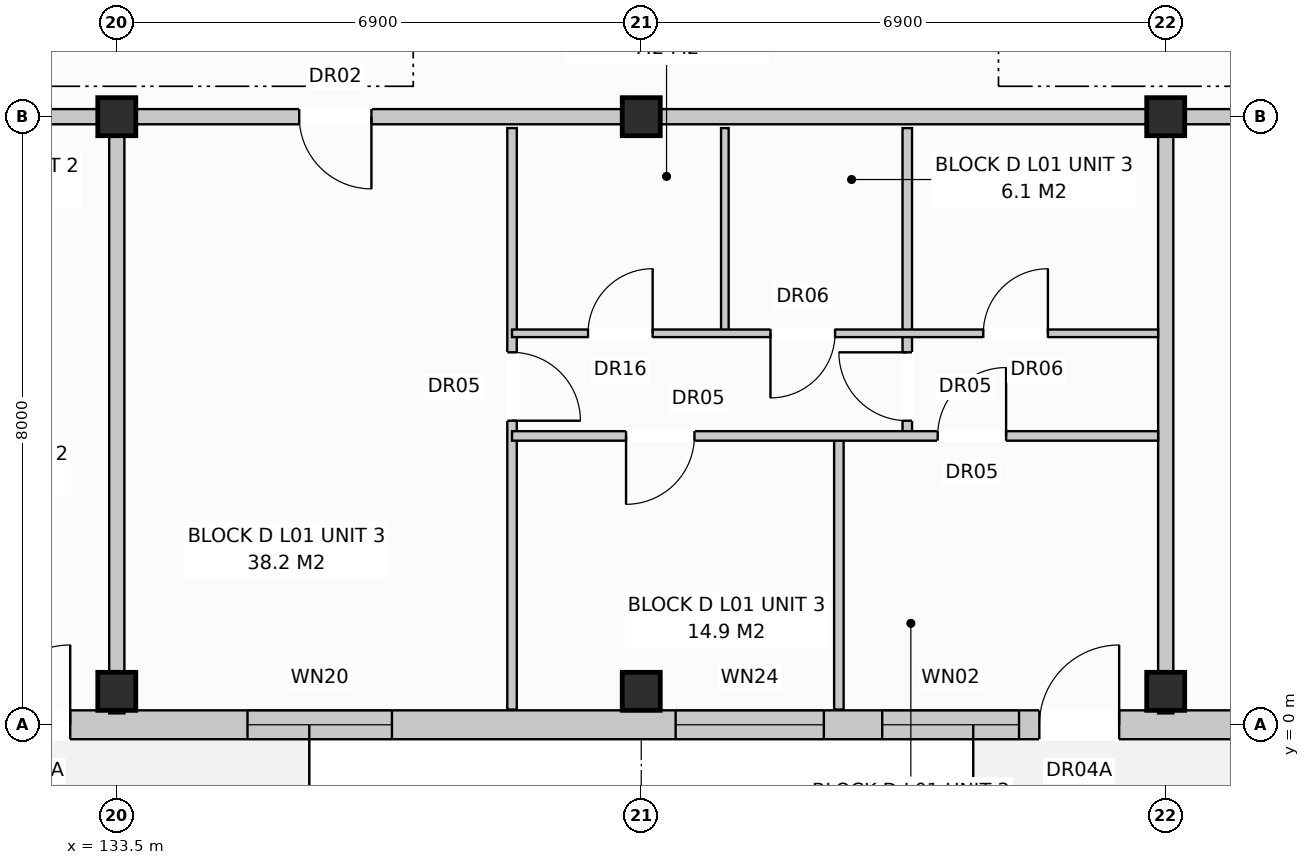
"""IFC4 building model, lengths in metres.
Left out: names, types, materials, properties, quantities, classifications, styles, units other than length and angle.
Written with IfcOpenShell. Run it as: python <this file> out.ifc"""

import sys

from ifc_helpers import new_model, si_unit, direction, frame, frame_2d, origin, origin_with_axes, origin_2d, place, context, subcontext, project, spatial, rectangle, extrude, element, fill, save


model = new_model("IFC4")
c1 = context("Model", 3, precision=1e-05, world=origin(), true_north=direction((0.0, 1.0)))
c2 = subcontext(c1, "Body", "Model", "MODEL_VIEW")
j1 = project(units=[si_unit("LENGTHUNIT", "METRE"), si_unit("PLANEANGLEUNIT", "RADIAN")], contexts=[c1])
p1 = place(None, origin())
s1 = spatial("IfcSite", under=j1, at=p1, CompositionType="ELEMENT")
p2 = place(p1, origin())
s2 = spatial("IfcBuilding", under=s1, at=p2, CompositionType="ELEMENT")
p3 = place(p2, frame((0.0, 0.0, 4.4)))
s3 = spatial("IfcBuildingStorey", under=s2, at=p3, CompositionType="ELEMENT", Elevation=4.4)
for number, where, z_axis, x_axis in (
    (1, (133.5, 0.44, 0.0), (0.0, 0.0, 1.0), (1.0, 0.0, 0.0)),
    (2, (133.5, 8.0, 0.0), (0.0, 0.0, 1.0), (1.0, 0.0, 0.0)),
    (3, (140.4, 0.44, 0.0), (0.0, 0.0, 1.0), (1.0, 0.0, 0.0)),
    (4, (140.4, 8.0, 0.0), (0.0, 0.0, 1.0), (1.0, 0.0, 0.0)),
    (5, (147.3, 0.44, 0.0), (0.0, 0.0, 1.0), (1.0, 0.0, 0.0)),
    (6, (147.3, 8.0, 0.0), (0.0, 0.0, 1.0), (1.0, 0.0, 0.0)),
):
    element("IfcColumn", number, at=place(p3, frame(where, z_axis=z_axis, x_axis=x_axis)), inside=s3, PredefinedType="COLUMN", context=c2, shape_type="SweptSolid", body=[
        extrude(rectangle(XDim=0.5, YDim=0.5, at=origin_2d()), origin(), (0.0, 0.0, 1.0), 3.6),
    ])
p4 = place(p3, frame((112.98, 0.0, 0.0), z_axis=(0.0, 0.0, 1.0), x_axis=(1.0, 0.0, 0.0)))
e7 = element("IfcWall", 7, at=p4, inside=s3, PredefinedType="STANDARD", context=c2, shape_type="SweptSolid", body=[
    extrude(rectangle(XDim=54.84, YDim=0.38, at=frame_2d((27.42, 0.0))), origin(), (0.0, 0.0, 1.0), 3.33),
])
p5 = place(p4, frame((5.04, 0.0, 0.0)))
e8 = element("IfcOpeningElement", 8, at=p5, cuts=e7, PredefinedType="OPENING", context=c2, shape_type="SweptSolid", body=[
    extrude(rectangle(XDim=1.05, YDim=2.12, at=frame_2d((0.525, 1.06))), frame((0.0, 0.202, 0.0), z_axis=(0.0, -1.0, 0.0), x_axis=(1.0, 0.0, 0.0)), (0.0, 0.0, 1.0), 0.404),
])
p6 = place(p4, frame((18.857, 0.0, 0.0)))
e9 = element("IfcOpeningElement", 9, at=p6, cuts=e7, PredefinedType="OPENING", context=c2, shape_type="SweptSolid", body=[
    extrude(rectangle(XDim=1.05, YDim=2.12, at=frame_2d((0.525, 1.06))), frame((0.0, 0.202, 0.0), z_axis=(0.0, -1.0, 0.0), x_axis=(1.0, 0.0, 0.0)), (0.0, 0.0, 1.0), 0.404),
])
p7 = place(p4, frame((32.657, 0.0, 0.0)))
e10 = element("IfcOpeningElement", 10, at=p7, cuts=e7, PredefinedType="OPENING", context=c2, shape_type="SweptSolid", body=[
    extrude(rectangle(XDim=1.05, YDim=2.12, at=frame_2d((0.525, 1.06))), frame((0.0, 0.202, 0.0), z_axis=(0.0, -1.0, 0.0), x_axis=(1.0, 0.0, 0.0)), (0.0, 0.0, 1.0), 0.404),
])
p8 = place(p4, frame((48.74, 0.0, 0.0)))
e11 = element("IfcOpeningElement", 11, at=p8, cuts=e7, PredefinedType="OPENING", context=c2, shape_type="SweptSolid", body=[
    extrude(rectangle(XDim=1.05, YDim=2.12, at=frame_2d((0.525, 1.06))), frame((0.0, 0.202, 0.0), z_axis=(0.0, -1.0, 0.0), x_axis=(1.0, 0.0, 0.0)), (0.0, 0.0, 1.0), 0.404),
])
p9 = place(p4, frame((0.89, 0.0, 0.8)))
e12 = element("IfcOpeningElement", 12, at=p9, cuts=e7, PredefinedType="OPENING", context=c2, shape_type="SweptSolid", body=[
    extrude(rectangle(XDim=1.8, YDim=1.7, at=frame_2d((0.9, 0.85))), frame((0.0, 0.202, 0.0), z_axis=(0.0, -1.0, 0.0), x_axis=(1.0, 0.0, 0.0)), (0.0, 0.0, 1.0), 0.404),
])
p10 = place(p4, frame((7.94, 0.0, 0.8)))
e13 = element("IfcOpeningElement", 13, at=p10, cuts=e7, PredefinedType="OPENING", context=c2, shape_type="SweptSolid", body=[
    extrude(rectangle(XDim=1.9, YDim=1.85, at=frame_2d((0.95, 0.925))), frame((0.0, 0.202, 0.0), z_axis=(0.0, -1.0, 0.0), x_axis=(1.0, 0.0, 0.0)), (0.0, 0.0, 1.0), 0.404),
])
p11 = place(p4, frame((11.215, 0.0, 0.8)))
e14 = element("IfcOpeningElement", 14, at=p11, cuts=e7, PredefinedType="OPENING", context=c2, shape_type="SweptSolid", body=[
    extrude(rectangle(XDim=1.95, YDim=1.65, at=frame_2d((0.975, 0.825))), frame((0.0, 0.202, 0.0), z_axis=(0.0, -1.0, 0.0), x_axis=(1.0, 0.0, 0.0)), (0.0, 0.0, 1.0), 0.404),
])
p12 = place(p4, frame((16.79, 0.0, 0.8)))
e15 = element("IfcOpeningElement", 15, at=p12, cuts=e7, PredefinedType="OPENING", context=c2, shape_type="SweptSolid", body=[
    extrude(rectangle(XDim=1.8, YDim=1.7, at=frame_2d((0.9, 0.85))), frame((0.0, 0.202, 0.0), z_axis=(0.0, -1.0, 0.0), x_axis=(1.0, 0.0, 0.0)), (0.0, 0.0, 1.0), 0.404),
])
p13 = place(p4, frame((22.24, 0.0, 0.8)))
e16 = element("IfcOpeningElement", 16, at=p13, cuts=e7, PredefinedType="OPENING", context=c2, shape_type="SweptSolid", body=[
    extrude(rectangle(XDim=1.9, YDim=1.85, at=frame_2d((0.95, 0.925))), frame((0.0, 0.202, 0.0), z_axis=(0.0, -1.0, 0.0), x_axis=(1.0, 0.0, 0.0)), (0.0, 0.0, 1.0), 0.404),
])
p14 = place(p4, frame((27.873, 0.0, 0.8)))
e17 = element("IfcOpeningElement", 17, at=p14, cuts=e7, PredefinedType="OPENING", context=c2, shape_type="SweptSolid", body=[
    extrude(rectangle(XDim=1.95, YDim=1.65, at=frame_2d((0.975, 0.825))), frame((0.0, 0.202, 0.0), z_axis=(0.0, -1.0, 0.0), x_axis=(1.0, 0.0, 0.0)), (0.0, 0.0, 1.0), 0.404),
])
p15 = place(p4, frame((30.59, 0.0, 0.8)))
e18 = element("IfcOpeningElement", 18, at=p15, cuts=e7, PredefinedType="OPENING", context=c2, shape_type="SweptSolid", body=[
    extrude(rectangle(XDim=1.8, YDim=1.7, at=frame_2d((0.9, 0.85))), frame((0.0, 0.202, 0.0), z_axis=(0.0, -1.0, 0.0), x_axis=(1.0, 0.0, 0.0)), (0.0, 0.0, 1.0), 0.404),
])
p16 = place(p4, frame((36.54, 0.0, 0.8)))
e19 = element("IfcOpeningElement", 19, at=p16, cuts=e7, PredefinedType="OPENING", context=c2, shape_type="SweptSolid", body=[
    extrude(rectangle(XDim=1.9, YDim=1.85, at=frame_2d((0.95, 0.925))), frame((0.0, 0.202, 0.0), z_axis=(0.0, -1.0, 0.0), x_axis=(1.0, 0.0, 0.0)), (0.0, 0.0, 1.0), 0.404),
])
p17 = place(p4, frame((42.215, 0.0, 0.8)))
e20 = element("IfcOpeningElement", 20, at=p17, cuts=e7, PredefinedType="OPENING", context=c2, shape_type="SweptSolid", body=[
    extrude(rectangle(XDim=1.95, YDim=1.65, at=frame_2d((0.975, 0.825))), frame((0.0, 0.202, 0.0), z_axis=(0.0, -1.0, 0.0), x_axis=(1.0, 0.0, 0.0)), (0.0, 0.0, 1.0), 0.404),
])
p18 = place(p4, frame((46.04, 0.0, 0.85)))
e21 = element("IfcOpeningElement", 21, at=p18, cuts=e7, PredefinedType="OPENING", context=c2, shape_type="SweptSolid", body=[
    extrude(rectangle(XDim=1.6, YDim=1.85, at=frame_2d((0.8, 0.925))), frame((0.0, 0.202, 0.0), z_axis=(0.0, -1.0, 0.0), x_axis=(1.0, 0.0, 0.0)), (0.0, 0.0, 1.0), 0.404),
])
p19 = place(p4, frame((52.04, 0.0, 0.8)))
e22 = element("IfcOpeningElement", 22, at=p19, cuts=e7, PredefinedType="OPENING", context=c2, shape_type="SweptSolid", body=[
    extrude(rectangle(XDim=1.9, YDim=1.85, at=frame_2d((0.95, 0.925))), frame((0.0, 0.202, 0.0), z_axis=(0.0, -1.0, 0.0), x_axis=(1.0, 0.0, 0.0)), (0.0, 0.0, 1.0), 0.404),
])
p20 = place(p3, frame((133.5, 7.85, 0.0), z_axis=(0.0, 0.0, 1.0), x_axis=(0.0, -1.0, 0.0)))
e23 = element("IfcWall", 23, at=p20, inside=s3, PredefinedType="PARTITIONING", context=c2, shape_type="SweptSolid", body=[
    extrude(rectangle(XDim=7.7, YDim=0.2, at=frame_2d((3.85, 0.0))), origin(), (0.0, 0.0, 1.0), 3.33),
])
p21 = place(p3, frame((119.7, 8.0, 0.0), z_axis=(0.0, 0.0, 1.0), x_axis=(1.0, 0.0, 0.0)))
e24 = element("IfcWall", 24, at=p21, inside=s3, PredefinedType="PARTITIONING", context=c2, shape_type="SweptSolid", body=[
    extrude(rectangle(XDim=13.8, YDim=0.2, at=frame_2d((6.9, 0.0))), origin(), (0.0, 0.0, 1.0), 2.77),
])
p22 = place(p21, frame((9.6, 0.0, 0.0)))
e25 = element("IfcOpeningElement", 25, at=p22, cuts=e24, PredefinedType="OPENING", context=c2, shape_type="SweptSolid", body=[
    extrude(rectangle(XDim=0.95, YDim=2.15, at=frame_2d((0.475, 1.075))), frame((0.0, 0.112, 0.0), z_axis=(0.0, -1.0, 0.0), x_axis=(1.0, 0.0, 0.0)), (0.0, 0.0, 1.0), 0.224),
])
p23 = place(p3, frame((147.3, 7.85, 0.0), z_axis=(0.0, 0.0, 1.0), x_axis=(0.0, -1.0, 0.0)))
e26 = element("IfcWall", 26, at=p23, inside=s3, PredefinedType="PARTITIONING", context=c2, shape_type="SweptSolid", body=[
    extrude(rectangle(XDim=7.7, YDim=0.2, at=frame_2d((3.85, 0.0))), origin(), (0.0, 0.0, 1.0), 3.33),
])
p24 = place(p3, frame((133.5, 8.0, 0.0), z_axis=(0.0, 0.0, 1.0), x_axis=(1.0, 0.0, 0.0)))
e27 = element("IfcWall", 27, at=p24, inside=s3, PredefinedType="PARTITIONING", context=c2, shape_type="SweptSolid", body=[
    extrude(rectangle(XDim=13.8, YDim=0.2, at=frame_2d((6.9, 0.0))), origin(), (0.0, 0.0, 1.0), 2.77),
])
p25 = place(p24, frame((2.4, 0.0, 0.0)))
e28 = element("IfcOpeningElement", 28, at=p25, cuts=e27, PredefinedType="OPENING", context=c2, shape_type="SweptSolid", body=[
    extrude(rectangle(XDim=0.95, YDim=2.15, at=frame_2d((0.475, 1.075))), frame((0.0, 0.112, 0.0), z_axis=(0.0, -1.0, 0.0), x_axis=(1.0, 0.0, 0.0)), (0.0, 0.0, 1.0), 0.224),
])
p26 = place(p3, frame((138.7, 7.85, 0.0), z_axis=(0.0, 0.0, 1.0), x_axis=(0.0, -1.0, 0.0)))
e29 = element("IfcWall", 29, at=p26, inside=s3, PredefinedType="PARTITIONING", context=c2, shape_type="SweptSolid", body=[
    extrude(rectangle(XDim=7.65, YDim=0.125, at=frame_2d((3.825, 0.0))), origin(), (0.0, 0.0, 1.0), 3.33),
])
p27 = place(p26, frame((2.95, 0.0, 0.0)))
e30 = element("IfcOpeningElement", 30, at=p27, cuts=e29, PredefinedType="OPENING", context=c2, shape_type="SweptSolid", body=[
    extrude(rectangle(XDim=0.9, YDim=2.1, at=frame_2d((0.45, 1.05))), frame((0.0, 0.074, 0.0), z_axis=(0.0, -1.0, 0.0), x_axis=(1.0, 0.0, 0.0)), (0.0, 0.0, 1.0), 0.149),
])
p28 = place(p3, frame((141.5, 7.85, 0.0), z_axis=(0.0, 0.0, 1.0), x_axis=(0.0, -1.0, 0.0)))
e31 = element("IfcWall", 31, at=p28, inside=s3, PredefinedType="PARTITIONING", context=c2, shape_type="SweptSolid", body=[
    extrude(rectangle(XDim=2.7, YDim=0.1, at=frame_2d((1.35, 0.0))), origin(), (0.0, 0.0, 1.0), 3.33),
])
p29 = place(p3, frame((143.9, 7.85, 0.0), z_axis=(0.0, 0.0, 1.0), x_axis=(0.0, -1.0, 0.0)))
e32 = element("IfcWall", 32, at=p29, inside=s3, PredefinedType="PARTITIONING", context=c2, shape_type="SweptSolid", body=[
    extrude(rectangle(XDim=4.05, YDim=0.125, at=frame_2d((2.025, 0.0))), origin(), (0.0, 0.0, 1.0), 3.33),
])
p30 = place(p29, frame((2.95, 0.0, 0.0)))
e33 = element("IfcOpeningElement", 33, at=p30, cuts=e32, PredefinedType="OPENING", context=c2, shape_type="SweptSolid", body=[
    extrude(rectangle(XDim=0.9, YDim=2.1, at=frame_2d((0.45, 1.05))), frame((0.0, 0.074, 0.0), z_axis=(0.0, -1.0, 0.0), x_axis=(1.0, 0.0, 0.0)), (0.0, 0.0, 1.0), 0.149),
])
p31 = place(p3, frame((143.0, 3.8, 0.0), z_axis=(0.0, 0.0, 1.0), x_axis=(0.0, -1.0, 0.0)))
e34 = element("IfcWall", 34, at=p31, inside=s3, PredefinedType="PARTITIONING", context=c2, shape_type="SweptSolid", body=[
    extrude(rectangle(XDim=3.6, YDim=0.125, at=frame_2d((1.8, 0.0))), origin(), (0.0, 0.0, 1.0), 2.99),
])
p32 = place(p3, frame((138.7, 5.15, 0.0), z_axis=(0.0, 0.0, 1.0), x_axis=(1.0, 0.0, 0.0)))
e35 = element("IfcWall", 35, at=p32, inside=s3, PredefinedType="PARTITIONING", context=c2, shape_type="SweptSolid", body=[
    extrude(rectangle(XDim=8.5, YDim=0.1, at=frame_2d((4.25, 0.0))), origin(), (0.0, 0.0, 1.0), 3.33),
])
p33 = place(p32, frame((1.0, 0.0, 0.0)))
e36 = element("IfcOpeningElement", 36, at=p33, cuts=e35, PredefinedType="OPENING", context=c2, shape_type="SweptSolid", body=[
    extrude(rectangle(XDim=0.85, YDim=2.1, at=frame_2d((0.425, 1.05))), frame((0.0, 0.062, 0.0), z_axis=(0.0, -1.0, 0.0), x_axis=(1.0, 0.0, 0.0)), (0.0, 0.0, 1.0), 0.124),
])
p34 = place(p32, frame((3.4, 0.0, 0.0)))
e37 = element("IfcOpeningElement", 37, at=p34, cuts=e35, PredefinedType="OPENING", context=c2, shape_type="SweptSolid", body=[
    extrude(rectangle(XDim=0.85, YDim=2.05, at=frame_2d((0.425, 1.025))), frame((0.0, 0.062, 0.0), z_axis=(0.0, -1.0, 0.0), x_axis=(1.0, 0.0, 0.0)), (0.0, 0.0, 1.0), 0.124),
])
p35 = place(p32, frame((6.2, 0.0, 0.0)))
e38 = element("IfcOpeningElement", 38, at=p35, cuts=e35, PredefinedType="OPENING", context=c2, shape_type="SweptSolid", body=[
    extrude(rectangle(XDim=0.85, YDim=2.05, at=frame_2d((0.425, 1.025))), frame((0.0, 0.062, 0.0), z_axis=(0.0, -1.0, 0.0), x_axis=(1.0, 0.0, 0.0)), (0.0, 0.0, 1.0), 0.124),
])
p36 = place(p3, frame((138.7, 3.8, 0.0), z_axis=(0.0, 0.0, 1.0), x_axis=(1.0, 0.0, 0.0)))
e39 = element("IfcWall", 39, at=p36, inside=s3, PredefinedType="PARTITIONING", context=c2, shape_type="SweptSolid", body=[
    extrude(rectangle(XDim=8.5, YDim=0.125, at=frame_2d((4.25, 0.0))), origin(), (0.0, 0.0, 1.0), 3.33),
])
p37 = place(p36, frame((1.5, 0.0, 0.0)))
e40 = element("IfcOpeningElement", 40, at=p37, cuts=e39, PredefinedType="OPENING", context=c2, shape_type="SweptSolid", body=[
    extrude(rectangle(XDim=0.9, YDim=2.1, at=frame_2d((0.45, 1.05))), frame((0.0, 0.074, 0.0), z_axis=(0.0, -1.0, 0.0), x_axis=(1.0, 0.0, 0.0)), (0.0, 0.0, 1.0), 0.149),
])
p38 = place(p36, frame((5.6, 0.0, 0.0)))
e41 = element("IfcOpeningElement", 41, at=p38, cuts=e39, PredefinedType="OPENING", context=c2, shape_type="SweptSolid", body=[
    extrude(rectangle(XDim=0.9, YDim=2.1, at=frame_2d((0.45, 1.05))), frame((0.0, 0.074, 0.0), z_axis=(0.0, -1.0, 0.0), x_axis=(1.0, 0.0, 0.0)), (0.0, 0.0, 1.0), 0.149),
])
p39 = place(p3, frame((147.3, 8.0, 0.0), z_axis=(0.0, 0.0, 1.0), x_axis=(1.0, 0.0, 0.0)))
e42 = element("IfcWall", 42, at=p39, inside=s3, PredefinedType="PARTITIONING", context=c2, shape_type="SweptSolid", body=[
    extrude(rectangle(XDim=20.7, YDim=0.2, at=frame_2d((10.35, 0.0))), origin(), (0.0, 0.0, 1.0), 2.77),
])
p40 = place(p39, frame((2.4, 0.0, 0.0)))
e43 = element("IfcOpeningElement", 43, at=p40, cuts=e42, PredefinedType="OPENING", context=c2, shape_type="SweptSolid", body=[
    extrude(rectangle(XDim=0.95, YDim=2.15, at=frame_2d((0.475, 1.075))), frame((0.0, 0.112, 0.0), z_axis=(0.0, -1.0, 0.0), x_axis=(1.0, 0.0, 0.0)), (0.0, 0.0, 1.0), 0.224),
])
p41 = place(p6, origin_with_axes())
e44 = element("IfcDoor", 44, at=p41, inside=s3, OperationType="SINGLE_SWING_RIGHT", PredefinedType="DOOR", context=c2, shape_type="SweptSolid", body=[
    extrude(rectangle(XDim=1.05, YDim=2.12, at=frame_2d((0.525, 1.06))), frame((0.0, 0.025, 0.0), z_axis=(0.0, -1.0, 0.0), x_axis=(1.0, 0.0, 0.0)), (0.0, 0.0, 1.0), 0.05),
])
fill(e9, e44)
p42 = place(p7, origin_with_axes())
e45 = element("IfcDoor", 45, at=p42, inside=s3, OperationType="SINGLE_SWING_RIGHT", PredefinedType="DOOR", context=c2, shape_type="SweptSolid", body=[
    extrude(rectangle(XDim=1.05, YDim=2.12, at=frame_2d((0.525, 1.06))), frame((0.0, 0.025, 0.0), z_axis=(0.0, -1.0, 0.0), x_axis=(1.0, 0.0, 0.0)), (0.0, 0.0, 1.0), 0.05),
])
fill(e10, e45)
p43 = place(p13, origin_with_axes())
e46 = element("IfcWindow", 46, at=p43, inside=s3, PartitioningType="SINGLE_PANEL", PredefinedType="WINDOW", context=c2, shape_type="SweptSolid", body=[
    extrude(rectangle(XDim=1.9, YDim=1.85, at=frame_2d((0.95, 0.925))), frame((0.0, 0.03, 0.0), z_axis=(0.0, -1.0, 0.0), x_axis=(1.0, 0.0, 0.0)), (0.0, 0.0, 1.0), 0.06),
])
fill(e16, e46)
p44 = place(p14, origin_with_axes())
e47 = element("IfcWindow", 47, at=p44, inside=s3, PartitioningType="SINGLE_PANEL", PredefinedType="WINDOW", context=c2, shape_type="SweptSolid", body=[
    extrude(rectangle(XDim=1.95, YDim=1.65, at=frame_2d((0.975, 0.825))), frame((0.0, 0.03, 0.0), z_axis=(0.0, -1.0, 0.0), x_axis=(1.0, 0.0, 0.0)), (0.0, 0.0, 1.0), 0.06),
])
fill(e17, e47)
p45 = place(p15, origin_with_axes())
e48 = element("IfcWindow", 48, at=p45, inside=s3, PartitioningType="SINGLE_PANEL", PredefinedType="WINDOW", context=c2, shape_type="SweptSolid", body=[
    extrude(rectangle(XDim=1.8, YDim=1.7, at=frame_2d((0.9, 0.85))), frame((0.0, 0.03, 0.0), z_axis=(0.0, -1.0, 0.0), x_axis=(1.0, 0.0, 0.0)), (0.0, 0.0, 1.0), 0.06),
])
fill(e18, e48)
p46 = place(p25, frame((0.95, 0.0, 0.0), z_axis=(0.0, 0.0, 1.0), x_axis=(-1.0, 0.0, 0.0)))
e49 = element("IfcDoor", 49, at=p46, inside=s3, OperationType="SINGLE_SWING_RIGHT", PredefinedType="DOOR", context=c2, shape_type="SweptSolid", body=[
    extrude(rectangle(XDim=0.95, YDim=2.15, at=frame_2d((0.475, 1.075))), frame((0.0, 0.025, 0.0), z_axis=(0.0, -1.0, 0.0), x_axis=(1.0, 0.0, 0.0)), (0.0, 0.0, 1.0), 0.05),
])
fill(e28, e49)
p47 = place(p27, origin_with_axes())
e50 = element("IfcDoor", 50, at=p47, inside=s3, OperationType="SINGLE_SWING_RIGHT", PredefinedType="DOOR", context=c2, shape_type="SweptSolid", body=[
    extrude(rectangle(XDim=0.9, YDim=2.1, at=frame_2d((0.45, 1.05))), frame((0.0, 0.025, 0.0), z_axis=(0.0, -1.0, 0.0), x_axis=(1.0, 0.0, 0.0)), (0.0, 0.0, 1.0), 0.05),
])
fill(e30, e50)
p48 = place(p30, frame((0.9, 0.0, 0.0), z_axis=(0.0, 0.0, 1.0), x_axis=(-1.0, 0.0, 0.0)))
e51 = element("IfcDoor", 51, at=p48, inside=s3, OperationType="SINGLE_SWING_LEFT", PredefinedType="DOOR", context=c2, shape_type="SweptSolid", body=[
    extrude(rectangle(XDim=0.9, YDim=2.1, at=frame_2d((0.45, 1.05))), frame((0.0, 0.025, 0.0), z_axis=(0.0, -1.0, 0.0), x_axis=(1.0, 0.0, 0.0)), (0.0, 0.0, 1.0), 0.05),
])
fill(e33, e51)
p49 = place(p33, origin_with_axes())
e52 = element("IfcDoor", 52, at=p49, inside=s3, OperationType="SINGLE_SWING_RIGHT", PredefinedType="DOOR", context=c2, shape_type="SweptSolid", body=[
    extrude(rectangle(XDim=0.85, YDim=2.1, at=frame_2d((0.425, 1.05))), frame((0.0, 0.025, 0.0), z_axis=(0.0, -1.0, 0.0), x_axis=(1.0, 0.0, 0.0)), (0.0, 0.0, 1.0), 0.05),
])
fill(e36, e52)
p50 = place(p34, frame((0.85, 0.0, 0.0), z_axis=(0.0, 0.0, 1.0), x_axis=(-1.0, 0.0, 0.0)))
e53 = element("IfcDoor", 53, at=p50, inside=s3, OperationType="SINGLE_SWING_LEFT", PredefinedType="DOOR", context=c2, shape_type="SweptSolid", body=[
    extrude(rectangle(XDim=0.85, YDim=2.05, at=frame_2d((0.425, 1.025))), frame((0.0, 0.025, 0.0), z_axis=(0.0, -1.0, 0.0), x_axis=(1.0, 0.0, 0.0)), (0.0, 0.0, 1.0), 0.05),
])
fill(e37, e53)
p51 = place(p35, origin_with_axes())
e54 = element("IfcDoor", 54, at=p51, inside=s3, OperationType="SINGLE_SWING_RIGHT", PredefinedType="DOOR", context=c2, shape_type="SweptSolid", body=[
    extrude(rectangle(XDim=0.85, YDim=2.05, at=frame_2d((0.425, 1.025))), frame((0.0, 0.025, 0.0), z_axis=(0.0, -1.0, 0.0), x_axis=(1.0, 0.0, 0.0)), (0.0, 0.0, 1.0), 0.05),
])
fill(e38, e54)
p52 = place(p37, frame((0.9, 0.0, 0.0), z_axis=(0.0, 0.0, 1.0), x_axis=(-1.0, 0.0, 0.0)))
e55 = element("IfcDoor", 55, at=p52, inside=s3, OperationType="SINGLE_SWING_LEFT", PredefinedType="DOOR", context=c2, shape_type="SweptSolid", body=[
    extrude(rectangle(XDim=0.9, YDim=2.1, at=frame_2d((0.45, 1.05))), frame((0.0, 0.025, 0.0), z_axis=(0.0, -1.0, 0.0), x_axis=(1.0, 0.0, 0.0)), (0.0, 0.0, 1.0), 0.05),
])
fill(e40, e55)
p53 = place(p38, origin_with_axes())
e56 = element("IfcDoor", 56, at=p53, inside=s3, OperationType="SINGLE_SWING_RIGHT", PredefinedType="DOOR", context=c2, shape_type="SweptSolid", body=[
    extrude(rectangle(XDim=0.9, YDim=2.1, at=frame_2d((0.45, 1.05))), frame((0.0, 0.025, 0.0), z_axis=(0.0, -1.0, 0.0), x_axis=(1.0, 0.0, 0.0)), (0.0, 0.0, 1.0), 0.05),
])
fill(e41, e56)
save(model, sys.argv[1])
